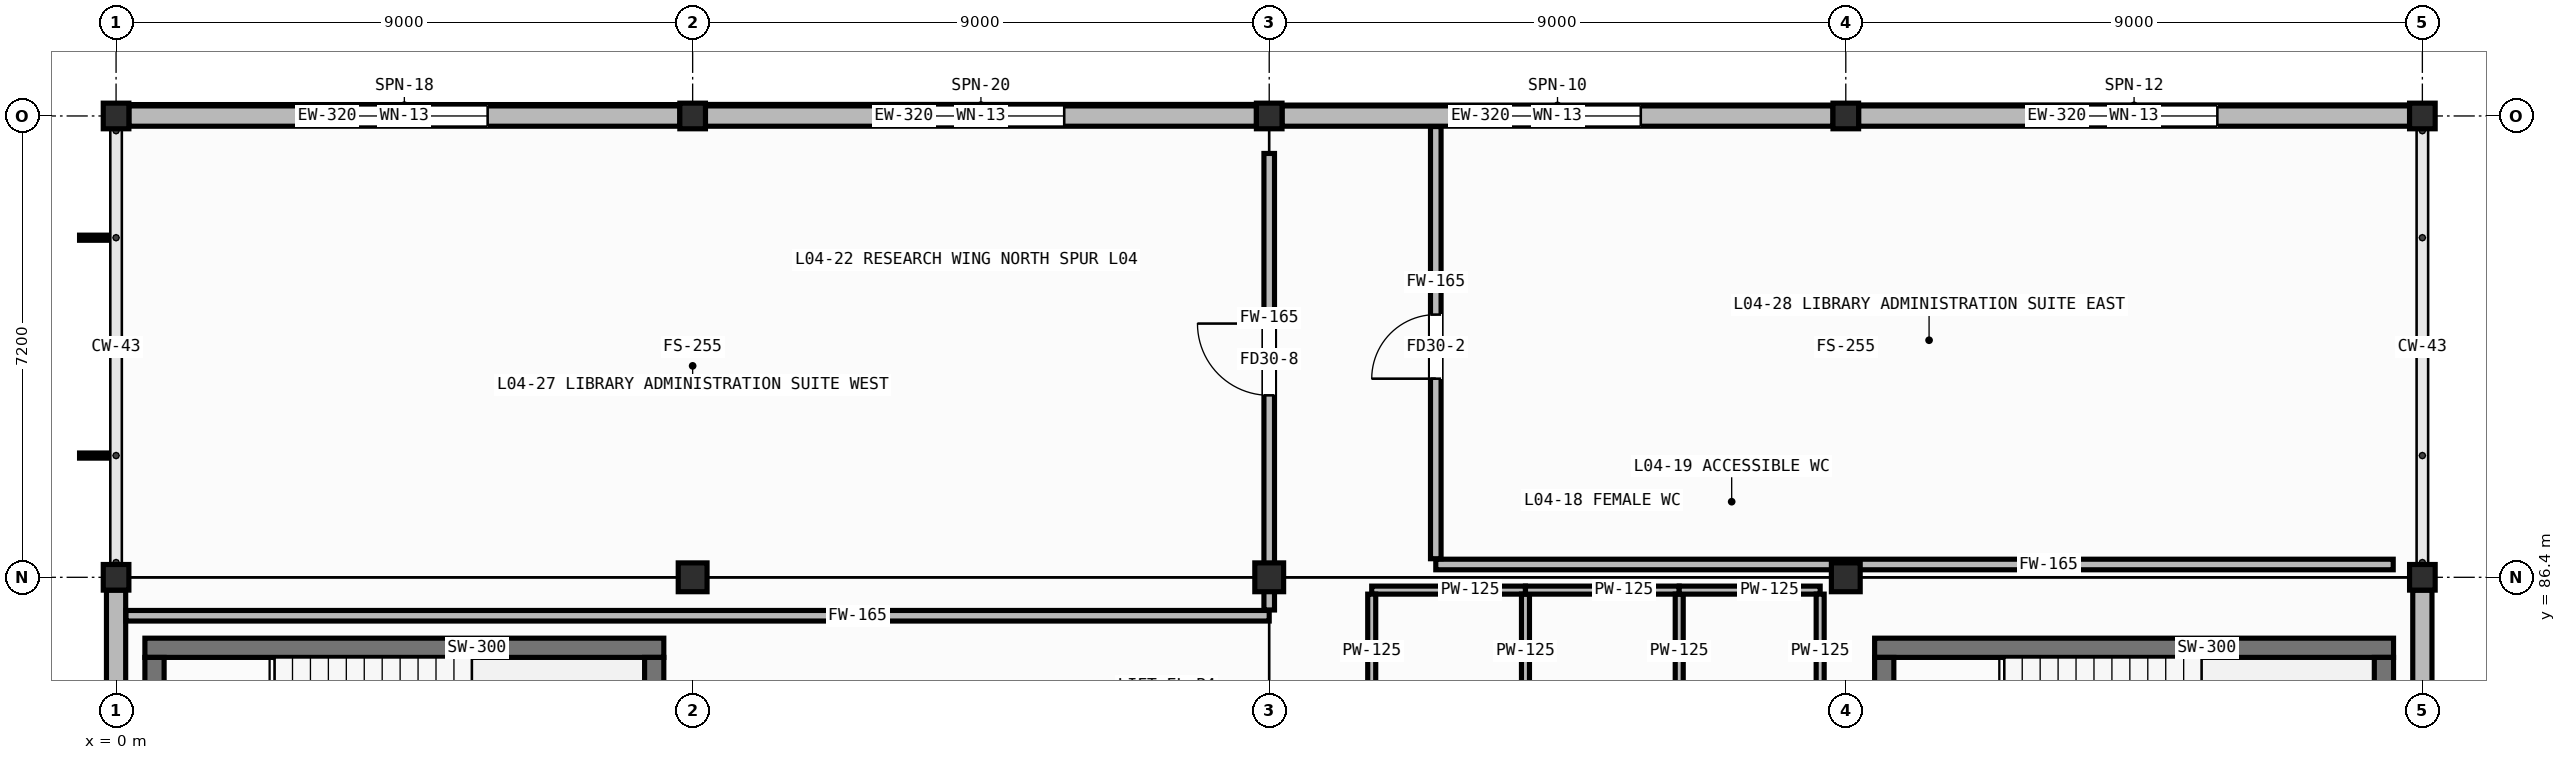
"""IFC4 building model, lengths in metres.
Left out: names, types, materials, properties, quantities, classifications, styles, units other than length and angle.
Written with IfcOpenShell. Run it as: python <this file> out.ifc"""

import sys

from ifc_helpers import new_model, si_unit, direction, frame, frame_2d, origin, origin_2d, place, context, subcontext, project, spatial, rectangle, hollow_rectangle, extrude, element, fill, save


model = new_model("IFC4")
c1 = context("Model", 3, precision=1e-05, world=origin(), true_north=direction((0.0, 1.0)))
c2 = subcontext(c1, "Body", "Model", "MODEL_VIEW")
j1 = project(units=[si_unit("LENGTHUNIT", "METRE"), si_unit("PLANEANGLEUNIT", "RADIAN")], contexts=[c1])
p1 = place(None, origin())
s1 = spatial("IfcSite", under=j1, at=p1, CompositionType="ELEMENT")
p2 = place(p1, origin())
s2 = spatial("IfcBuilding", under=s1, at=p2, CompositionType="ELEMENT")
p3 = place(p2, frame((0.0, 0.0, 12.8)))
s3 = spatial("IfcBuildingStorey", under=s2, at=p3, CompositionType="ELEMENT", Elevation=12.8)
for number, where, z_axis, x_axis in (
    (1, (0.0, 86.4, 0.0), (0.0, 0.0, 1.0), (1.0, 0.0, 0.0)),
    (2, (0.0, 93.6, 0.0), (0.0, 0.0, 1.0), (1.0, 0.0, 0.0)),
):
    element("IfcColumn", number, at=place(p3, frame(where, z_axis=z_axis, x_axis=x_axis)), inside=s3, PredefinedType="COLUMN", context=c2, shape_type="SweptSolid", body=[
        extrude(hollow_rectangle(XDim=0.4, YDim=0.4, WallThickness=0.016, at=origin_2d()), origin(), (0.0, 0.0, 1.0), 4.2),
    ])
p4 = place(p3, frame((9.0, 86.4, 0.0), z_axis=(0.0, 0.0, 1.0), x_axis=(1.0, 0.0, 0.0)))
e3 = element("IfcColumn", 3, at=p4, inside=s3, PredefinedType="COLUMN", context=c2, shape_type="SweptSolid", body=[
    extrude(hollow_rectangle(XDim=0.45, YDim=0.45, WallThickness=0.019, at=origin_2d()), origin(), (0.0, 0.0, 1.0), 4.2),
])
p5 = place(p3, frame((9.0, 93.6, 0.0), z_axis=(0.0, 0.0, 1.0), x_axis=(1.0, 0.0, 0.0)))
e4 = element("IfcColumn", 4, at=p5, inside=s3, PredefinedType="COLUMN", context=c2, shape_type="SweptSolid", body=[
    extrude(hollow_rectangle(XDim=0.4, YDim=0.4, WallThickness=0.016, at=origin_2d()), origin(), (0.0, 0.0, 1.0), 4.2),
])
p6 = place(p3, frame((18.0, 86.4, 0.0), z_axis=(0.0, 0.0, 1.0), x_axis=(1.0, 0.0, 0.0)))
e5 = element("IfcColumn", 5, at=p6, inside=s3, PredefinedType="COLUMN", context=c2, shape_type="SweptSolid", body=[
    extrude(hollow_rectangle(XDim=0.45, YDim=0.45, WallThickness=0.019, at=origin_2d()), origin(), (0.0, 0.0, 1.0), 4.2),
])
p7 = place(p3, frame((18.0, 93.6, 0.0), z_axis=(0.0, 0.0, 1.0), x_axis=(1.0, 0.0, 0.0)))
e6 = element("IfcColumn", 6, at=p7, inside=s3, PredefinedType="COLUMN", context=c2, shape_type="SweptSolid", body=[
    extrude(hollow_rectangle(XDim=0.4, YDim=0.4, WallThickness=0.016, at=origin_2d()), origin(), (0.0, 0.0, 1.0), 4.2),
])
p8 = place(p3, frame((27.0, 86.4, 0.0), z_axis=(0.0, 0.0, 1.0), x_axis=(1.0, 0.0, 0.0)))
e7 = element("IfcColumn", 7, at=p8, inside=s3, PredefinedType="COLUMN", context=c2, shape_type="SweptSolid", body=[
    extrude(hollow_rectangle(XDim=0.45, YDim=0.45, WallThickness=0.019, at=origin_2d()), origin(), (0.0, 0.0, 1.0), 4.2),
])
for number, where, z_axis, x_axis in (
    (8, (27.0, 93.6, 0.0), (0.0, 0.0, 1.0), (1.0, 0.0, 0.0)),
    (9, (36.0, 86.4, 0.0), (0.0, 0.0, 1.0), (1.0, 0.0, 0.0)),
    (10, (36.0, 93.6, 0.0), (0.0, 0.0, 1.0), (1.0, 0.0, 0.0)),
):
    element("IfcColumn", number, at=place(p3, frame(where, z_axis=z_axis, x_axis=x_axis)), inside=s3, PredefinedType="COLUMN", context=c2, shape_type="SweptSolid", body=[
        extrude(hollow_rectangle(XDim=0.4, YDim=0.4, WallThickness=0.016, at=origin_2d()), origin(), (0.0, 0.0, 1.0), 4.2),
    ])
p9 = place(p3, frame((8.8, 93.6, 0.0), z_axis=(0.0, 0.0, 1.0), x_axis=(-1.0, 0.0, 0.0)))
e11 = element("IfcWall", 11, at=p9, inside=s3, PredefinedType="STANDARD", context=c2, shape_type="SweptSolid", body=[
    extrude(rectangle(XDim=8.6, YDim=0.32, at=frame_2d((4.3, 0.0))), origin(), (0.0, 0.0, 1.0), 3.49),
])
p10 = place(p9, frame((3.0, 0.0, 0.85)))
e12 = element("IfcOpeningElement", 12, at=p10, cuts=e11, PredefinedType="OPENING", context=c2, shape_type="SweptSolid", body=[
    extrude(rectangle(XDim=2.6, YDim=1.6, at=frame_2d((1.3, 0.8))), frame((0.0, 0.172, 0.0), z_axis=(0.0, -1.0, 0.0), x_axis=(1.0, 0.0, 0.0)), (0.0, 0.0, 1.0), 0.344),
])
p11 = place(p3, frame((17.8, 93.6, 0.0), z_axis=(0.0, 0.0, 1.0), x_axis=(-1.0, 0.0, 0.0)))
e13 = element("IfcWall", 13, at=p11, inside=s3, PredefinedType="STANDARD", context=c2, shape_type="SweptSolid", body=[
    extrude(rectangle(XDim=8.6, YDim=0.32, at=frame_2d((4.3, 0.0))), origin(), (0.0, 0.0, 1.0), 3.49),
])
p12 = place(p11, frame((3.0, 0.0, 0.85)))
e14 = element("IfcOpeningElement", 14, at=p12, cuts=e13, PredefinedType="OPENING", context=c2, shape_type="SweptSolid", body=[
    extrude(rectangle(XDim=2.6, YDim=1.6, at=frame_2d((1.3, 0.8))), frame((0.0, 0.172, 0.0), z_axis=(0.0, -1.0, 0.0), x_axis=(1.0, 0.0, 0.0)), (0.0, 0.0, 1.0), 0.344),
])
p13 = place(p3, frame((26.8, 93.6, 0.0), z_axis=(0.0, 0.0, 1.0), x_axis=(-1.0, 0.0, 0.0)))
e15 = element("IfcWall", 15, at=p13, inside=s3, PredefinedType="STANDARD", context=c2, shape_type="SweptSolid", body=[
    extrude(rectangle(XDim=8.6, YDim=0.32, at=frame_2d((4.3, 0.0))), origin(), (0.0, 0.0, 1.0), 3.49),
])
p14 = place(p13, frame((3.0, 0.0, 0.85)))
e16 = element("IfcOpeningElement", 16, at=p14, cuts=e15, PredefinedType="OPENING", context=c2, shape_type="SweptSolid", body=[
    extrude(rectangle(XDim=2.6, YDim=1.6, at=frame_2d((1.3, 0.8))), frame((0.0, 0.172, 0.0), z_axis=(0.0, -1.0, 0.0), x_axis=(1.0, 0.0, 0.0)), (0.0, 0.0, 1.0), 0.344),
])
p15 = place(p3, frame((35.8, 93.6, 0.0), z_axis=(0.0, 0.0, 1.0), x_axis=(-1.0, 0.0, 0.0)))
e17 = element("IfcWall", 17, at=p15, inside=s3, PredefinedType="STANDARD", context=c2, shape_type="SweptSolid", body=[
    extrude(rectangle(XDim=8.6, YDim=0.32, at=frame_2d((4.3, 0.0))), origin(), (0.0, 0.0, 1.0), 3.49),
])
p16 = place(p15, frame((3.0, 0.0, 0.85)))
e18 = element("IfcOpeningElement", 18, at=p16, cuts=e17, PredefinedType="OPENING", context=c2, shape_type="SweptSolid", body=[
    extrude(rectangle(XDim=2.6, YDim=1.6, at=frame_2d((1.3, 0.8))), frame((0.0, 0.172, 0.0), z_axis=(0.0, -1.0, 0.0), x_axis=(1.0, 0.0, 0.0)), (0.0, 0.0, 1.0), 0.344),
])
for number, where, z_axis, x_axis in (
    (19, (0.0, 79.4, 0.0), (0.0, 0.0, 1.0), (0.0, 1.0, 0.0)),
    (20, (36.0, 86.2, 0.0), (0.0, 0.0, 1.0), (0.0, -1.0, 0.0)),
):
    element("IfcWall", number, at=place(p3, frame(where, z_axis=z_axis, x_axis=x_axis)), inside=s3, PredefinedType="STANDARD", context=c2, shape_type="SweptSolid", body=[
        extrude(rectangle(XDim=6.8, YDim=0.3, at=frame_2d((3.4, 0.0))), origin(), (0.0, 0.0, 1.0), 3.49),
    ])
p17 = place(p3, frame((0.45, 85.3, 0.0), z_axis=(0.0, 0.0, 1.0), x_axis=(1.0, 0.0, 0.0)))
e21 = element("IfcWall", 21, at=p17, inside=s3, PredefinedType="SHEAR", context=c2, shape_type="SweptSolid", body=[
    extrude(rectangle(XDim=8.1, YDim=0.3, at=frame_2d((4.05, 0.0))), origin(), (0.0, 0.0, 1.0), 3.94),
])
for number, where, z_axis, x_axis in (
    (22, (0.6, 81.35, 0.0), (0.0, 0.0, 1.0), (0.0, 1.0, 0.0)),
    (23, (8.4, 81.35, 0.0), (0.0, 0.0, 1.0), (0.0, 1.0, 0.0)),
):
    element("IfcWall", number, at=place(p3, frame(where, z_axis=z_axis, x_axis=x_axis)), inside=s3, PredefinedType="SHEAR", context=c2, shape_type="SweptSolid", body=[
        extrude(rectangle(XDim=3.8, YDim=0.3, at=frame_2d((1.9, 0.0))), origin(), (0.0, 0.0, 1.0), 3.94),
    ])
p18 = place(p3, frame((27.45, 85.3, 0.0), z_axis=(0.0, 0.0, 1.0), x_axis=(1.0, 0.0, 0.0)))
e24 = element("IfcWall", 24, at=p18, inside=s3, PredefinedType="SHEAR", context=c2, shape_type="SweptSolid", body=[
    extrude(rectangle(XDim=8.1, YDim=0.3, at=frame_2d((4.05, 0.0))), origin(), (0.0, 0.0, 1.0), 3.94),
])
for number, where, z_axis, x_axis in (
    (25, (27.6, 81.35, 0.0), (0.0, 0.0, 1.0), (0.0, 1.0, 0.0)),
    (26, (35.4, 81.35, 0.0), (0.0, 0.0, 1.0), (0.0, 1.0, 0.0)),
):
    element("IfcWall", number, at=place(p3, frame(where, z_axis=z_axis, x_axis=x_axis)), inside=s3, PredefinedType="SHEAR", context=c2, shape_type="SweptSolid", body=[
        extrude(rectangle(XDim=3.8, YDim=0.3, at=frame_2d((1.9, 0.0))), origin(), (0.0, 0.0, 1.0), 3.94),
    ])
p19 = place(p3, frame((19.6, 86.2, 0.0), z_axis=(0.0, 0.0, 1.0), x_axis=(1.0, 0.0, 0.0)))
e27 = element("IfcWall", 27, at=p19, inside=s3, PredefinedType="PARTITIONING", context=c2, shape_type="SweptSolid", body=[
    extrude(rectangle(XDim=2.4, YDim=0.125, at=frame_2d((1.2, 0.0))), origin(), (0.0, 0.0, 1.0), 3.22),
])
for number, where, z_axis, x_axis in (
    (28, (19.6, 83.69, 0.0), (0.0, 0.0, 1.0), (0.0, 1.0, 0.0)),
    (29, (22.0, 83.69, 0.0), (0.0, 0.0, 1.0), (0.0, 1.0, 0.0)),
):
    element("IfcWall", number, at=place(p3, frame(where, z_axis=z_axis, x_axis=x_axis)), inside=s3, PredefinedType="PARTITIONING", context=c2, shape_type="SweptSolid", body=[
        extrude(rectangle(XDim=2.448, YDim=0.125, at=frame_2d((1.224, 0.0))), origin(), (0.0, 0.0, 1.0), 3.94),
    ])
p20 = place(p3, frame((22.0, 86.2, 0.0), z_axis=(0.0, 0.0, 1.0), x_axis=(1.0, 0.0, 0.0)))
e30 = element("IfcWall", 30, at=p20, inside=s3, PredefinedType="PARTITIONING", context=c2, shape_type="SweptSolid", body=[
    extrude(rectangle(XDim=2.4, YDim=0.125, at=frame_2d((1.2, 0.0))), origin(), (0.0, 0.0, 1.0), 3.22),
])
p21 = place(p3, frame((24.4, 83.69, 0.0), z_axis=(0.0, 0.0, 1.0), x_axis=(0.0, 1.0, 0.0)))
e31 = element("IfcWall", 31, at=p21, inside=s3, PredefinedType="PARTITIONING", context=c2, shape_type="SweptSolid", body=[
    extrude(rectangle(XDim=2.448, YDim=0.125, at=frame_2d((1.224, 0.0))), origin(), (0.0, 0.0, 1.0), 3.94),
])
p22 = place(p3, frame((24.4, 86.2, 0.0), z_axis=(0.0, 0.0, 1.0), x_axis=(1.0, 0.0, 0.0)))
e32 = element("IfcWall", 32, at=p22, inside=s3, PredefinedType="PARTITIONING", context=c2, shape_type="SweptSolid", body=[
    extrude(rectangle(XDim=2.2, YDim=0.125, at=frame_2d((1.1, 0.0))), origin(), (0.0, 0.0, 1.0), 3.22),
])
p23 = place(p3, frame((26.6, 83.69, 0.0), z_axis=(0.0, 0.0, 1.0), x_axis=(0.0, 1.0, 0.0)))
e33 = element("IfcWall", 33, at=p23, inside=s3, PredefinedType="PARTITIONING", context=c2, shape_type="SweptSolid", body=[
    extrude(rectangle(XDim=2.448, YDim=0.125, at=frame_2d((1.224, 0.0))), origin(), (0.0, 0.0, 1.0), 3.94),
])
p24 = place(p3, frame((0.155, 85.8, 0.0), z_axis=(0.0, 0.0, 1.0), x_axis=(1.0, 0.0, 0.0)))
e34 = element("IfcWall", 34, at=p24, inside=s3, PredefinedType="PARTITIONING", context=c2, shape_type="SweptSolid", body=[
    extrude(rectangle(XDim=17.845, YDim=0.165, at=frame_2d((8.922, 0.0))), origin(), (0.0, 0.0, 1.0), 3.94),
])
p25 = place(p3, frame((18.0, 85.89, 0.0), z_axis=(0.0, 0.0, 1.0), x_axis=(0.0, 1.0, 0.0)))
e35 = element("IfcWall", 35, at=p25, inside=s3, PredefinedType="PARTITIONING", context=c2, shape_type="SweptSolid", body=[
    extrude(rectangle(XDim=7.125, YDim=0.165, at=frame_2d((3.562, 0.0))), origin(), (0.0, 0.0, 1.0), 3.22),
])
p26 = place(p25, frame((3.35, 0.0, 0.0)))
e36 = element("IfcOpeningElement", 36, at=p26, cuts=e35, PredefinedType="OPENING", context=c2, shape_type="SweptSolid", body=[
    extrude(rectangle(XDim=1.12, YDim=2.08, at=frame_2d((0.56, 1.04))), frame((0.0, 0.094, 0.0), z_axis=(0.0, -1.0, 0.0), x_axis=(1.0, 0.0, 0.0)), (0.0, 0.0, 1.0), 0.189),
])
p27 = place(p3, frame((20.6, 86.6, 0.0), z_axis=(0.0, 0.0, 1.0), x_axis=(1.0, 0.0, 0.0)))
e37 = element("IfcWall", 37, at=p27, inside=s3, PredefinedType="PARTITIONING", context=c2, shape_type="SweptSolid", body=[
    extrude(rectangle(XDim=14.945, YDim=0.165, at=frame_2d((7.472, 0.0))), origin(), (0.0, 0.0, 1.0), 3.22),
])
p28 = place(p3, frame((20.6, 86.69, 0.0), z_axis=(0.0, 0.0, 1.0), x_axis=(0.0, 1.0, 0.0)))
e38 = element("IfcWall", 38, at=p28, inside=s3, PredefinedType="PARTITIONING", context=c2, shape_type="SweptSolid", body=[
    extrude(rectangle(XDim=6.745, YDim=0.165, at=frame_2d((3.373, 0.0))), origin(), (0.0, 0.0, 1.0), 3.94),
])
p29 = place(p28, frame((2.81, 0.0, 0.0)))
e39 = element("IfcOpeningElement", 39, at=p29, cuts=e38, PredefinedType="OPENING", context=c2, shape_type="SweptSolid", body=[
    extrude(rectangle(XDim=1.0, YDim=2.08, at=frame_2d((0.5, 1.04))), frame((0.0, 0.094, 0.0), z_axis=(0.0, -1.0, 0.0), x_axis=(1.0, 0.0, 0.0)), (0.0, 0.0, 1.0), 0.189),
])
p30 = place(p10, origin())
e40 = element("IfcWindow", 40, at=p30, inside=s3, PartitioningType="DOUBLE_PANEL_VERTICAL", PredefinedType="WINDOW", context=c2, shape_type="SweptSolid", body=[
    extrude(rectangle(XDim=2.6, YDim=1.6, at=frame_2d((1.3, 0.8))), frame((0.0, 0.03, 0.0), z_axis=(0.0, -1.0, 0.0), x_axis=(1.0, 0.0, 0.0)), (0.0, 0.0, 1.0), 0.06),
])
fill(e12, e40)
p31 = place(p12, origin())
e41 = element("IfcWindow", 41, at=p31, inside=s3, PartitioningType="DOUBLE_PANEL_VERTICAL", PredefinedType="WINDOW", context=c2, shape_type="SweptSolid", body=[
    extrude(rectangle(XDim=2.6, YDim=1.6, at=frame_2d((1.3, 0.8))), frame((0.0, 0.03, 0.0), z_axis=(0.0, -1.0, 0.0), x_axis=(1.0, 0.0, 0.0)), (0.0, 0.0, 1.0), 0.06),
])
fill(e14, e41)
p32 = place(p14, origin())
e42 = element("IfcWindow", 42, at=p32, inside=s3, PartitioningType="DOUBLE_PANEL_VERTICAL", PredefinedType="WINDOW", context=c2, shape_type="SweptSolid", body=[
    extrude(rectangle(XDim=2.6, YDim=1.6, at=frame_2d((1.3, 0.8))), frame((0.0, 0.03, 0.0), z_axis=(0.0, -1.0, 0.0), x_axis=(1.0, 0.0, 0.0)), (0.0, 0.0, 1.0), 0.06),
])
fill(e16, e42)
p33 = place(p16, origin())
e43 = element("IfcWindow", 43, at=p33, inside=s3, PartitioningType="DOUBLE_PANEL_VERTICAL", PredefinedType="WINDOW", context=c2, shape_type="SweptSolid", body=[
    extrude(rectangle(XDim=2.6, YDim=1.6, at=frame_2d((1.3, 0.8))), frame((0.0, 0.03, 0.0), z_axis=(0.0, -1.0, 0.0), x_axis=(1.0, 0.0, 0.0)), (0.0, 0.0, 1.0), 0.06),
])
fill(e18, e43)
p34 = place(p26, origin())
e44 = element("IfcDoor", 44, at=p34, inside=s3, OperationType="SINGLE_SWING_RIGHT", PredefinedType="DOOR", context=c2, shape_type="SweptSolid", body=[
    extrude(rectangle(XDim=1.12, YDim=2.08, at=frame_2d((0.56, 1.04))), frame((0.0, 0.025, 0.0), z_axis=(0.0, -1.0, 0.0), x_axis=(1.0, 0.0, 0.0)), (0.0, 0.0, 1.0), 0.05),
])
fill(e36, e44)
p35 = place(p29, origin())
e45 = element("IfcDoor", 45, at=p35, inside=s3, OperationType="SINGLE_SWING_LEFT", PredefinedType="DOOR", context=c2, shape_type="SweptSolid", body=[
    extrude(rectangle(XDim=1.0, YDim=2.08, at=frame_2d((0.5, 1.04))), frame((0.0, 0.025, 0.0), z_axis=(0.0, -1.0, 0.0), x_axis=(1.0, 0.0, 0.0)), (0.0, 0.0, 1.0), 0.05),
])
fill(e39, e45)
save(model, sys.argv[1])
